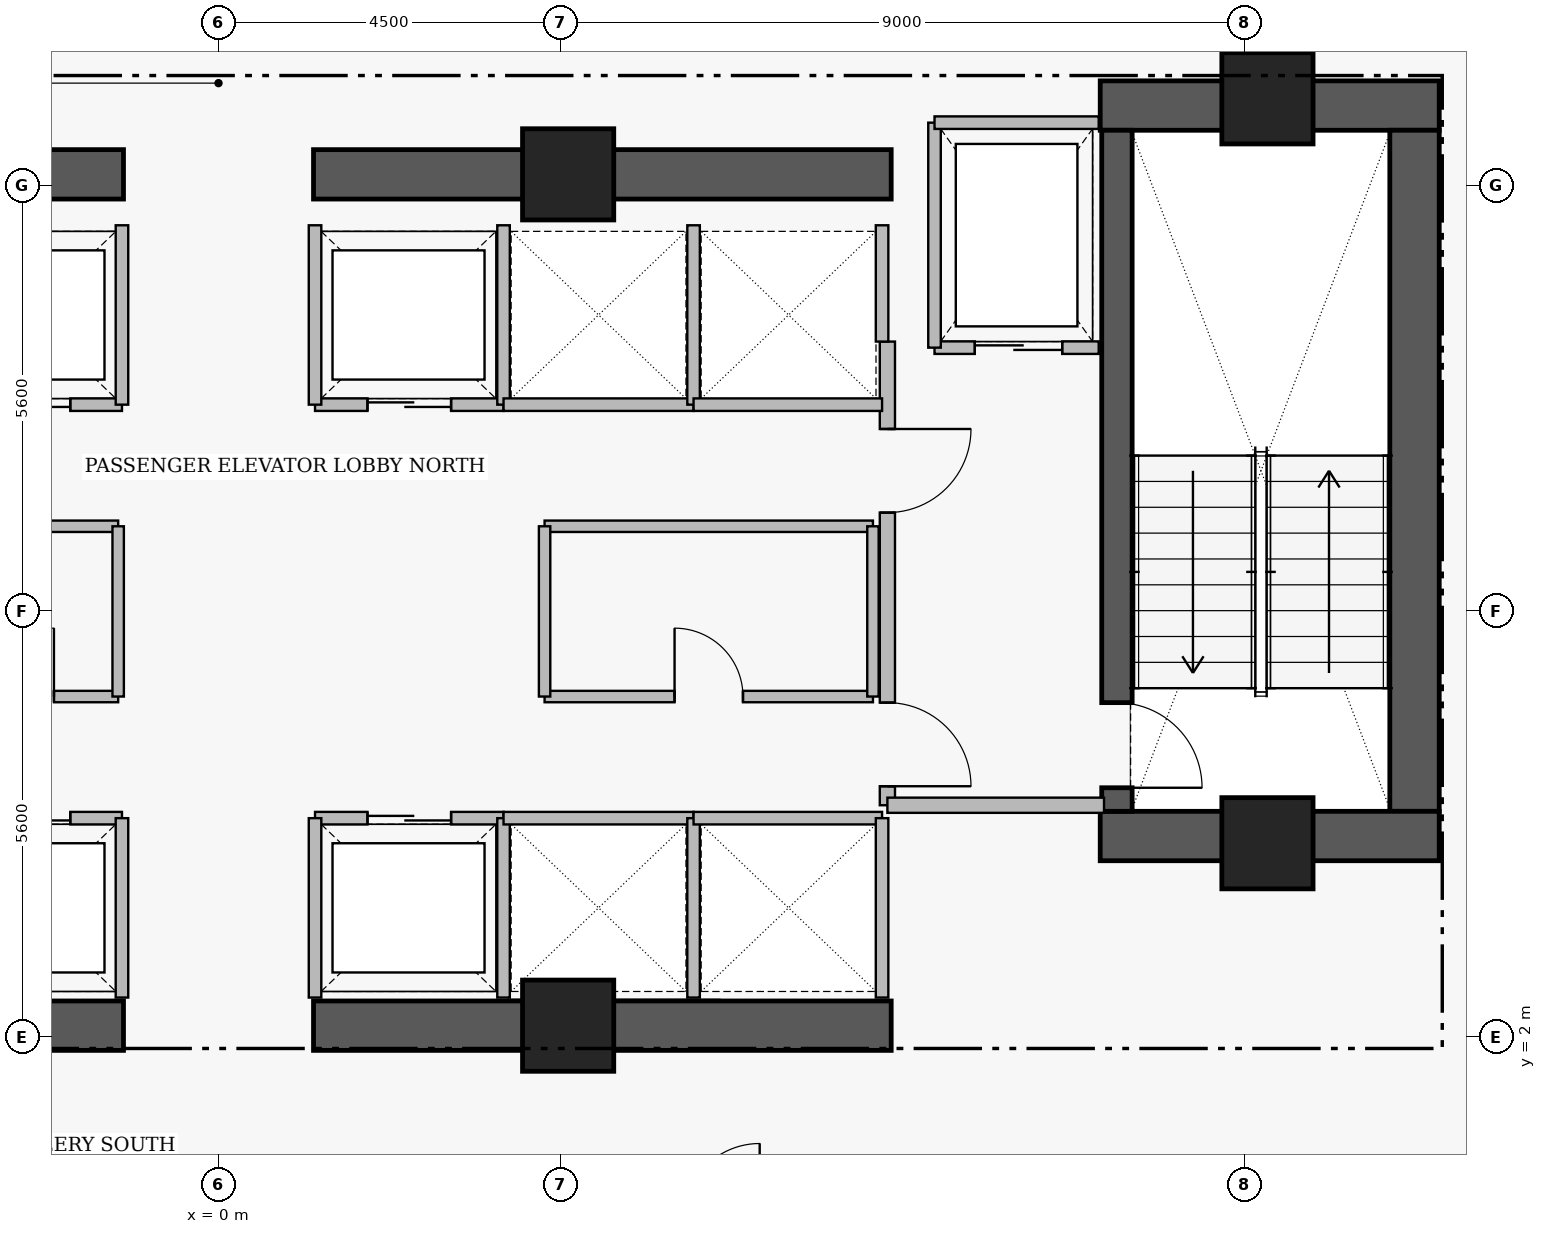
"""IFC4 building model, lengths in metres.
Left out: names, types, materials, properties, quantities, classifications, styles, units other than length and angle.
Written with IfcOpenShell. Run it as: python <this file> out.ifc"""

import sys

from ifc_helpers import new_model, si_unit, direction, frame, frame_2d, origin, origin_2d, place, context, subcontext, project, spatial, rectangle, extrude, element, fill, save


model = new_model("IFC4")
c1 = context("Model", 3, precision=1e-05, world=origin(), true_north=direction((0.0, 1.0)))
c2 = subcontext(c1, "Body", "Model", "MODEL_VIEW")
j1 = project(units=[si_unit("LENGTHUNIT", "METRE"), si_unit("PLANEANGLEUNIT", "RADIAN")], contexts=[c1])
p1 = place(None, origin())
s1 = spatial("IfcSite", under=j1, at=p1, CompositionType="ELEMENT")
p2 = place(p1, origin())
s2 = spatial("IfcBuilding", under=s1, at=p2, CompositionType="ELEMENT")
p3 = place(p2, frame((0.0, 0.0, 211.15)))
s3 = spatial("IfcBuildingStorey", under=s2, at=p3, CompositionType="ELEMENT", Elevation=211.15)
p4 = place(p3, frame((11.6, 14.255, 0.0), z_axis=(0.0, 0.0, 1.0), x_axis=(1.0, 0.0, 0.0)))
e1 = element("IfcWall", 1, at=p4, inside=s3, PredefinedType="SHEAR", context=c2, shape_type="SweptSolid", body=[
    extrude(rectangle(XDim=4.46, YDim=0.65, at=frame_2d((2.23, 0.0))), origin(), (0.0, 0.0, 1.0), 3.56),
])
p5 = place(p3, frame((15.735, 4.97, 0.0), z_axis=(0.0, 0.0, 1.0), x_axis=(0.0, 1.0, 0.0)))
e2 = element("IfcWall", 2, at=p5, inside=s3, PredefinedType="SHEAR", context=c2, shape_type="SweptSolid", body=[
    extrude(rectangle(XDim=8.96, YDim=0.65, at=frame_2d((4.48, 0.0))), origin(), (0.0, 0.0, 1.0), 3.56),
])
p6 = place(p3, frame((11.6, 4.645, 0.0), z_axis=(0.0, 0.0, 1.0), x_axis=(1.0, 0.0, 0.0)))
e3 = element("IfcWall", 3, at=p6, inside=s3, PredefinedType="SHEAR", context=c2, shape_type="SweptSolid", body=[
    extrude(rectangle(XDim=4.46, YDim=0.65, at=frame_2d((2.23, 0.0))), origin(), (0.0, 0.0, 1.0), 3.56),
])
for number, where, z_axis, x_axis in (
    (4, (-8.85, 2.15, 0.0), (0.0, 0.0, 1.0), (1.0, 0.0, 0.0)),
    (5, (1.25, 2.15, 0.0), (0.0, 0.0, 1.0), (1.0, 0.0, 0.0)),
    (6, (-8.85, 13.35, 0.0), (0.0, 0.0, 1.0), (1.0, 0.0, 0.0)),
    (7, (1.25, 13.35, 0.0), (0.0, 0.0, 1.0), (1.0, 0.0, 0.0)),
):
    element("IfcWall", number, at=place(p3, frame(where, z_axis=z_axis, x_axis=x_axis)), inside=s3, PredefinedType="SHEAR", context=c2, shape_type="SweptSolid", body=[
        extrude(rectangle(XDim=7.6, YDim=0.65, at=frame_2d((3.8, 0.0))), origin(), (0.0, 0.0, 1.0), 3.53),
    ])
p7 = place(p3, frame((11.82, 13.93, 0.0), z_axis=(0.0, 0.0, 1.0), x_axis=(0.0, -1.0, 0.0)))
e8 = element("IfcWall", 8, at=p7, inside=s3, PredefinedType="SHEAR", context=c2, shape_type="SweptSolid", body=[
    extrude(rectangle(XDim=8.96, YDim=0.4, at=frame_2d((4.48, 0.0))), origin(), (0.0, 0.0, 1.0), 3.56),
])
p8 = place(p7, frame((7.53, 0.0, 0.0)))
e9 = element("IfcOpeningElement", 9, at=p8, cuts=e8, PredefinedType="OPENING", context=c2, shape_type="SweptSolid", body=[
    extrude(rectangle(XDim=1.12, YDim=2.22, at=frame_2d((0.56, 1.11))), frame((0.0, 0.21, 0.0), z_axis=(0.0, -1.0, 0.0), x_axis=(1.0, 0.0, 0.0)), (0.0, 0.0, 1.0), 0.42),
])
for number, where, z_axis, x_axis in (
    (10, (4.6, 13.35, 0.0), (0.0, 0.0, 1.0), (1.0, 0.0, 0.0)),
    (11, (13.8, 14.35, 0.0), (0.0, 0.0, 1.0), (1.0, 0.0, 0.0)),
    (12, (4.6, 2.15, 0.0), (0.0, 0.0, 1.0), (1.0, 0.0, 0.0)),
    (13, (13.8, 4.55, 0.0), (0.0, 0.0, 1.0), (1.0, 0.0, 0.0)),
):
    element("IfcColumn", number, at=place(p3, frame(where, z_axis=z_axis, x_axis=x_axis)), inside=s3, PredefinedType="COLUMN", context=c2, shape_type="SweptSolid", body=[
        extrude(rectangle(XDim=1.2, YDim=1.2, at=origin_2d()), origin(), (0.0, 0.0, 1.0), 3.75),
    ])
p9 = place(p3, frame((8.8, 11.15, 0.0), z_axis=(0.0, 0.0, 1.0), x_axis=(0.0, -1.0, 0.0)))
e14 = element("IfcWall", 14, at=p9, inside=s3, PredefinedType="PARTITIONING", context=c2, shape_type="SweptSolid", body=[
    extrude(rectangle(XDim=6.1, YDim=0.2, at=frame_2d((3.05, 0.0))), origin(), (0.0, 0.0, 1.0), 3.53),
])
p10 = place(p9, frame((1.15, 0.0, 0.0)))
e15 = element("IfcOpeningElement", 15, at=p10, cuts=e14, PredefinedType="OPENING", context=c2, shape_type="SweptSolid", body=[
    extrude(rectangle(XDim=1.1, YDim=2.2, at=frame_2d((0.55, 1.1))), frame((0.0, 0.11, 0.0), z_axis=(0.0, -1.0, 0.0), x_axis=(1.0, 0.0, 0.0)), (0.0, 0.0, 1.0), 0.22),
])
p11 = place(p9, frame((4.75, 0.0, 0.0)))
e16 = element("IfcOpeningElement", 16, at=p11, cuts=e14, PredefinedType="OPENING", context=c2, shape_type="SweptSolid", body=[
    extrude(rectangle(XDim=1.1, YDim=2.2, at=frame_2d((0.55, 1.1))), frame((0.0, 0.11, 0.0), z_axis=(0.0, -1.0, 0.0), x_axis=(1.0, 0.0, 0.0)), (0.0, 0.0, 1.0), 0.22),
])
p12 = place(p3, frame((9.42, 11.07, 0.0), z_axis=(0.0, 0.0, 1.0), x_axis=(1.0, 0.0, 0.0)))
e17 = element("IfcWall", 17, at=p12, inside=s3, PredefinedType="PARTITIONING", context=c2, shape_type="SweptSolid", body=[
    extrude(rectangle(XDim=2.16, YDim=0.165, at=frame_2d((1.08, 0.0))), origin(), (0.0, 0.0, 1.0), 3.53),
])
p13 = place(p12, frame((0.53, 0.0, 0.0)))
e18 = element("IfcOpeningElement", 18, at=p13, cuts=e17, PredefinedType="OPENING", context=c2, shape_type="SweptSolid", body=[
    extrude(rectangle(XDim=1.15, YDim=2.25, at=frame_2d((0.575, 1.125))), frame((0.0, 0.093, 0.0), z_axis=(0.0, -1.0, 0.0), x_axis=(1.0, 0.0, 0.0)), (0.0, 0.0, 1.0), 0.185),
])
p14 = place(p3, frame((-3.73, 4.88, 0.0), z_axis=(0.0, 0.0, 1.0), x_axis=(1.0, 0.0, 0.0)))
e19 = element("IfcWall", 19, at=p14, inside=s3, PredefinedType="PARTITIONING", context=c2, shape_type="SweptSolid", body=[
    extrude(rectangle(XDim=2.46, YDim=0.165, at=frame_2d((1.23, 0.0))), origin(), (0.0, 0.0, 1.0), 3.53),
])
p15 = place(p14, frame((0.68, 0.0, 0.0)))
e20 = element("IfcOpeningElement", 20, at=p15, cuts=e19, PredefinedType="OPENING", context=c2, shape_type="SweptSolid", body=[
    extrude(rectangle(XDim=1.1, YDim=2.25, at=frame_2d((0.55, 1.125))), frame((0.0, 0.093, 0.0), z_axis=(0.0, -1.0, 0.0), x_axis=(1.0, 0.0, 0.0)), (0.0, 0.0, 1.0), 0.185),
])
p16 = place(p3, frame((1.27, 4.88, 0.0), z_axis=(0.0, 0.0, 1.0), x_axis=(1.0, 0.0, 0.0)))
e21 = element("IfcWall", 21, at=p16, inside=s3, PredefinedType="PARTITIONING", context=c2, shape_type="SweptSolid", body=[
    extrude(rectangle(XDim=2.48, YDim=0.165, at=frame_2d((1.24, 0.0))), origin(), (0.0, 0.0, 1.0), 3.53),
])
p17 = place(p16, frame((0.69, 0.0, 0.0)))
e22 = element("IfcOpeningElement", 22, at=p17, cuts=e21, PredefinedType="OPENING", context=c2, shape_type="SweptSolid", body=[
    extrude(rectangle(XDim=1.1, YDim=2.25, at=frame_2d((0.55, 1.125))), frame((0.0, 0.093, 0.0), z_axis=(0.0, -1.0, 0.0), x_axis=(1.0, 0.0, 0.0)), (0.0, 0.0, 1.0), 0.185),
])
p18 = place(p3, frame((-3.73, 10.32, 0.0), z_axis=(0.0, 0.0, 1.0), x_axis=(1.0, 0.0, 0.0)))
e23 = element("IfcWall", 23, at=p18, inside=s3, PredefinedType="PARTITIONING", context=c2, shape_type="SweptSolid", body=[
    extrude(rectangle(XDim=2.46, YDim=0.165, at=frame_2d((1.23, 0.0))), origin(), (0.0, 0.0, 1.0), 3.53),
])
p19 = place(p18, frame((0.68, 0.0, 0.0)))
e24 = element("IfcOpeningElement", 24, at=p19, cuts=e23, PredefinedType="OPENING", context=c2, shape_type="SweptSolid", body=[
    extrude(rectangle(XDim=1.1, YDim=2.25, at=frame_2d((0.55, 1.125))), frame((0.0, 0.093, 0.0), z_axis=(0.0, -1.0, 0.0), x_axis=(1.0, 0.0, 0.0)), (0.0, 0.0, 1.0), 0.185),
])
p20 = place(p3, frame((1.27, 10.32, 0.0), z_axis=(0.0, 0.0, 1.0), x_axis=(1.0, 0.0, 0.0)))
e25 = element("IfcWall", 25, at=p20, inside=s3, PredefinedType="PARTITIONING", context=c2, shape_type="SweptSolid", body=[
    extrude(rectangle(XDim=2.48, YDim=0.165, at=frame_2d((1.24, 0.0))), origin(), (0.0, 0.0, 1.0), 3.53),
])
p21 = place(p20, frame((0.69, 0.0, 0.0)))
e26 = element("IfcOpeningElement", 26, at=p21, cuts=e25, PredefinedType="OPENING", context=c2, shape_type="SweptSolid", body=[
    extrude(rectangle(XDim=1.1, YDim=2.25, at=frame_2d((0.55, 1.125))), frame((0.0, 0.093, 0.0), z_axis=(0.0, -1.0, 0.0), x_axis=(1.0, 0.0, 0.0)), (0.0, 0.0, 1.0), 0.185),
])
p22 = place(p3, frame((-3.91, 6.48, 0.0), z_axis=(0.0, 0.0, 1.0), x_axis=(1.0, 0.0, 0.0)))
e27 = element("IfcWall", 27, at=p22, inside=s3, PredefinedType="PARTITIONING", context=c2, shape_type="SweptSolid", body=[
    extrude(rectangle(XDim=2.59, YDim=0.15, at=frame_2d((1.295, 0.0))), origin(), (0.0, 0.0, 1.0), 3.53),
])
p23 = place(p22, frame((0.845, 0.0, 0.0)))
e28 = element("IfcOpeningElement", 28, at=p23, cuts=e27, PredefinedType="OPENING", context=c2, shape_type="SweptSolid", body=[
    extrude(rectangle(XDim=0.9, YDim=2.15, at=frame_2d((0.45, 1.075))), frame((0.0, 0.085, 0.0), z_axis=(0.0, -1.0, 0.0), x_axis=(1.0, 0.0, 0.0)), (0.0, 0.0, 1.0), 0.17),
])
p24 = place(p3, frame((4.29, 6.48, 0.0), z_axis=(0.0, 0.0, 1.0), x_axis=(1.0, 0.0, 0.0)))
e29 = element("IfcWall", 29, at=p24, inside=s3, PredefinedType="PARTITIONING", context=c2, shape_type="SweptSolid", body=[
    extrude(rectangle(XDim=4.32, YDim=0.15, at=frame_2d((2.16, 0.0))), origin(), (0.0, 0.0, 1.0), 3.53),
])
p25 = place(p24, frame((1.71, 0.0, 0.0)))
e30 = element("IfcOpeningElement", 30, at=p25, cuts=e29, PredefinedType="OPENING", context=c2, shape_type="SweptSolid", body=[
    extrude(rectangle(XDim=0.9, YDim=2.15, at=frame_2d((0.45, 1.075))), frame((0.0, 0.085, 0.0), z_axis=(0.0, -1.0, 0.0), x_axis=(1.0, 0.0, 0.0)), (0.0, 0.0, 1.0), 0.17),
])
p26 = place(p3, frame((8.8, 5.05, 0.0), z_axis=(0.0, 0.0, 1.0), x_axis=(1.0, 0.0, 0.0)))
e31 = element("IfcWall", 31, at=p26, inside=s3, PredefinedType="PARTITIONING", context=c2, shape_type="SweptSolid", body=[
    extrude(rectangle(XDim=2.85, YDim=0.2, at=frame_2d((1.425, 0.0))), origin(), (0.0, 0.0, 1.0), 3.53),
])
p27 = place(p3, frame((9.42, 11.07, 0.0), z_axis=(0.0, 0.0, 1.0), x_axis=(0.0, 1.0, 0.0)))
e32 = element("IfcWall", 32, at=p27, inside=s3, PredefinedType="PARTITIONING", context=c2, shape_type="SweptSolid", body=[
    extrude(rectangle(XDim=2.96, YDim=0.165, at=frame_2d((1.48, 0.0))), origin(), (0.0, 0.0, 1.0), 3.53),
])
p28 = place(p3, frame((9.42, 14.03, 0.0), z_axis=(0.0, 0.0, 1.0), x_axis=(1.0, 0.0, 0.0)))
e33 = element("IfcWall", 33, at=p28, inside=s3, PredefinedType="PARTITIONING", context=c2, shape_type="SweptSolid", body=[
    extrude(rectangle(XDim=2.16, YDim=0.165, at=frame_2d((1.08, 0.0))), origin(), (0.0, 0.0, 1.0), 3.53),
])
for number, where, z_axis, x_axis in (
    (34, (-1.27, 2.52, 0.0), (0.0, 0.0, 1.0), (0.0, 1.0, 0.0)),
    (35, (1.27, 2.52, 0.0), (0.0, 0.0, 1.0), (0.0, 1.0, 0.0)),
    (36, (3.75, 2.52, 0.0), (0.0, 0.0, 1.0), (0.0, 1.0, 0.0)),
    (37, (-1.27, 10.32, 0.0), (0.0, 0.0, 1.0), (0.0, 1.0, 0.0)),
    (38, (1.27, 10.32, 0.0), (0.0, 0.0, 1.0), (0.0, 1.0, 0.0)),
    (39, (3.75, 10.32, 0.0), (0.0, 0.0, 1.0), (0.0, 1.0, 0.0)),
):
    element("IfcWall", number, at=place(p3, frame(where, z_axis=z_axis, x_axis=x_axis)), inside=s3, PredefinedType="PARTITIONING", context=c2, shape_type="SweptSolid", body=[
        extrude(rectangle(XDim=2.36, YDim=0.165, at=frame_2d((1.18, 0.0))), origin(), (0.0, 0.0, 1.0), 3.53),
    ])
p29 = place(p3, frame((3.75, 4.88, 0.0), z_axis=(0.0, 0.0, 1.0), x_axis=(1.0, 0.0, 0.0)))
e40 = element("IfcWall", 40, at=p29, inside=s3, PredefinedType="PARTITIONING", context=c2, shape_type="SweptSolid", body=[
    extrude(rectangle(XDim=2.5, YDim=0.165, at=frame_2d((1.25, 0.0))), origin(), (0.0, 0.0, 1.0), 3.53),
])
p30 = place(p3, frame((6.25, 2.52, 0.0), z_axis=(0.0, 0.0, 1.0), x_axis=(0.0, 1.0, 0.0)))
e41 = element("IfcWall", 41, at=p30, inside=s3, PredefinedType="PARTITIONING", context=c2, shape_type="SweptSolid", body=[
    extrude(rectangle(XDim=2.36, YDim=0.165, at=frame_2d((1.18, 0.0))), origin(), (0.0, 0.0, 1.0), 3.53),
])
p31 = place(p3, frame((6.25, 4.88, 0.0), z_axis=(0.0, 0.0, 1.0), x_axis=(1.0, 0.0, 0.0)))
e42 = element("IfcWall", 42, at=p31, inside=s3, PredefinedType="PARTITIONING", context=c2, shape_type="SweptSolid", body=[
    extrude(rectangle(XDim=2.48, YDim=0.165, at=frame_2d((1.24, 0.0))), origin(), (0.0, 0.0, 1.0), 3.53),
])
p32 = place(p3, frame((8.73, 2.52, 0.0), z_axis=(0.0, 0.0, 1.0), x_axis=(0.0, 1.0, 0.0)))
e43 = element("IfcWall", 43, at=p32, inside=s3, PredefinedType="PARTITIONING", context=c2, shape_type="SweptSolid", body=[
    extrude(rectangle(XDim=2.36, YDim=0.165, at=frame_2d((1.18, 0.0))), origin(), (0.0, 0.0, 1.0), 3.53),
])
p33 = place(p3, frame((3.75, 10.32, 0.0), z_axis=(0.0, 0.0, 1.0), x_axis=(1.0, 0.0, 0.0)))
e44 = element("IfcWall", 44, at=p33, inside=s3, PredefinedType="PARTITIONING", context=c2, shape_type="SweptSolid", body=[
    extrude(rectangle(XDim=2.5, YDim=0.165, at=frame_2d((1.25, 0.0))), origin(), (0.0, 0.0, 1.0), 3.53),
])
p34 = place(p3, frame((6.25, 10.32, 0.0), z_axis=(0.0, 0.0, 1.0), x_axis=(0.0, 1.0, 0.0)))
e45 = element("IfcWall", 45, at=p34, inside=s3, PredefinedType="PARTITIONING", context=c2, shape_type="SweptSolid", body=[
    extrude(rectangle(XDim=2.36, YDim=0.165, at=frame_2d((1.18, 0.0))), origin(), (0.0, 0.0, 1.0), 3.53),
])
p35 = place(p3, frame((6.25, 10.32, 0.0), z_axis=(0.0, 0.0, 1.0), x_axis=(1.0, 0.0, 0.0)))
e46 = element("IfcWall", 46, at=p35, inside=s3, PredefinedType="PARTITIONING", context=c2, shape_type="SweptSolid", body=[
    extrude(rectangle(XDim=2.48, YDim=0.165, at=frame_2d((1.24, 0.0))), origin(), (0.0, 0.0, 1.0), 3.53),
])
p36 = place(p3, frame((8.73, 11.15, 0.0), z_axis=(0.0, 0.0, 1.0), x_axis=(0.0, 1.0, 0.0)))
e47 = element("IfcWall", 47, at=p36, inside=s3, PredefinedType="PARTITIONING", context=c2, shape_type="SweptSolid", body=[
    extrude(rectangle(XDim=1.53, YDim=0.165, at=frame_2d((0.765, 0.0))), origin(), (0.0, 0.0, 1.0), 3.53),
])
p37 = place(p3, frame((-3.91, 8.72, 0.0), z_axis=(0.0, 0.0, 1.0), x_axis=(1.0, 0.0, 0.0)))
e48 = element("IfcWall", 48, at=p37, inside=s3, PredefinedType="PARTITIONING", context=c2, shape_type="SweptSolid", body=[
    extrude(rectangle(XDim=2.59, YDim=0.15, at=frame_2d((1.295, 0.0))), origin(), (0.0, 0.0, 1.0), 3.53),
])
p38 = place(p3, frame((-1.32, 6.48, 0.0), z_axis=(0.0, 0.0, 1.0), x_axis=(0.0, 1.0, 0.0)))
e49 = element("IfcWall", 49, at=p38, inside=s3, PredefinedType="PARTITIONING", context=c2, shape_type="SweptSolid", body=[
    extrude(rectangle(XDim=2.24, YDim=0.15, at=frame_2d((1.12, 0.0))), origin(), (0.0, 0.0, 1.0), 3.53),
])
p39 = place(p3, frame((4.29, 8.72, 0.0), z_axis=(0.0, 0.0, 1.0), x_axis=(1.0, 0.0, 0.0)))
e50 = element("IfcWall", 50, at=p39, inside=s3, PredefinedType="PARTITIONING", context=c2, shape_type="SweptSolid", body=[
    extrude(rectangle(XDim=4.32, YDim=0.15, at=frame_2d((2.16, 0.0))), origin(), (0.0, 0.0, 1.0), 3.53),
])
for number, where, z_axis, x_axis in (
    (51, (4.29, 6.48, 0.0), (0.0, 0.0, 1.0), (0.0, 1.0, 0.0)),
    (52, (8.61, 6.48, 0.0), (0.0, 0.0, 1.0), (0.0, 1.0, 0.0)),
):
    element("IfcWall", number, at=place(p3, frame(where, z_axis=z_axis, x_axis=x_axis)), inside=s3, PredefinedType="PARTITIONING", context=c2, shape_type="SweptSolid", body=[
        extrude(rectangle(XDim=2.24, YDim=0.15, at=frame_2d((1.12, 0.0))), origin(), (0.0, 0.0, 1.0), 3.53),
    ])
p40 = place(p8, origin())
e53 = element("IfcDoor", 53, at=p40, inside=s3, OperationType="SINGLE_SWING_RIGHT", PredefinedType="DOOR", context=c2, shape_type="SweptSolid", body=[
    extrude(rectangle(XDim=1.12, YDim=2.22, at=frame_2d((0.56, 1.11))), frame((0.0, 0.025, 0.0), z_axis=(0.0, -1.0, 0.0), x_axis=(1.0, 0.0, 0.0)), (0.0, 0.0, 1.0), 0.05),
])
fill(e9, e53)
p41 = place(p10, origin())
e54 = element("IfcDoor", 54, at=p41, inside=s3, OperationType="SINGLE_SWING_LEFT", PredefinedType="DOOR", context=c2, shape_type="SweptSolid", body=[
    extrude(rectangle(XDim=1.1, YDim=2.2, at=frame_2d((0.55, 1.1))), frame((0.0, 0.025, 0.0), z_axis=(0.0, -1.0, 0.0), x_axis=(1.0, 0.0, 0.0)), (0.0, 0.0, 1.0), 0.05),
])
fill(e15, e54)
p42 = place(p11, origin())
e55 = element("IfcDoor", 55, at=p42, inside=s3, OperationType="SINGLE_SWING_RIGHT", PredefinedType="DOOR", context=c2, shape_type="SweptSolid", body=[
    extrude(rectangle(XDim=1.1, YDim=2.2, at=frame_2d((0.55, 1.1))), frame((0.0, 0.025, 0.0), z_axis=(0.0, -1.0, 0.0), x_axis=(1.0, 0.0, 0.0)), (0.0, 0.0, 1.0), 0.05),
])
fill(e16, e55)
p43 = place(p13, origin())
e56 = element("IfcDoor", 56, at=p43, inside=s3, OperationType="SLIDING_TO_LEFT", PredefinedType="DOOR", context=c2, shape_type="SweptSolid", body=[
    extrude(rectangle(XDim=1.15, YDim=2.25, at=frame_2d((0.575, 1.125))), frame((0.0, 0.025, 0.0), z_axis=(0.0, -1.0, 0.0), x_axis=(1.0, 0.0, 0.0)), (0.0, 0.0, 1.0), 0.05),
])
fill(e18, e56)
p44 = place(p15, origin())
e57 = element("IfcDoor", 57, at=p44, inside=s3, OperationType="SLIDING_TO_LEFT", PredefinedType="DOOR", context=c2, shape_type="SweptSolid", body=[
    extrude(rectangle(XDim=1.1, YDim=2.25, at=frame_2d((0.55, 1.125))), frame((0.0, 0.025, 0.0), z_axis=(0.0, -1.0, 0.0), x_axis=(1.0, 0.0, 0.0)), (0.0, 0.0, 1.0), 0.05),
])
fill(e20, e57)
p45 = place(p17, origin())
e58 = element("IfcDoor", 58, at=p45, inside=s3, OperationType="SLIDING_TO_LEFT", PredefinedType="DOOR", context=c2, shape_type="SweptSolid", body=[
    extrude(rectangle(XDim=1.1, YDim=2.25, at=frame_2d((0.55, 1.125))), frame((0.0, 0.025, 0.0), z_axis=(0.0, -1.0, 0.0), x_axis=(1.0, 0.0, 0.0)), (0.0, 0.0, 1.0), 0.05),
])
fill(e22, e58)
p46 = place(p19, origin())
e59 = element("IfcDoor", 59, at=p46, inside=s3, OperationType="SLIDING_TO_LEFT", PredefinedType="DOOR", context=c2, shape_type="SweptSolid", body=[
    extrude(rectangle(XDim=1.1, YDim=2.25, at=frame_2d((0.55, 1.125))), frame((0.0, 0.025, 0.0), z_axis=(0.0, -1.0, 0.0), x_axis=(1.0, 0.0, 0.0)), (0.0, 0.0, 1.0), 0.05),
])
fill(e24, e59)
p47 = place(p21, origin())
e60 = element("IfcDoor", 60, at=p47, inside=s3, OperationType="SLIDING_TO_LEFT", PredefinedType="DOOR", context=c2, shape_type="SweptSolid", body=[
    extrude(rectangle(XDim=1.1, YDim=2.25, at=frame_2d((0.55, 1.125))), frame((0.0, 0.025, 0.0), z_axis=(0.0, -1.0, 0.0), x_axis=(1.0, 0.0, 0.0)), (0.0, 0.0, 1.0), 0.05),
])
fill(e26, e60)
p48 = place(p23, origin())
e61 = element("IfcDoor", 61, at=p48, inside=s3, OperationType="SINGLE_SWING_RIGHT", PredefinedType="DOOR", context=c2, shape_type="SweptSolid", body=[
    extrude(rectangle(XDim=0.9, YDim=2.15, at=frame_2d((0.45, 1.075))), frame((0.0, 0.025, 0.0), z_axis=(0.0, -1.0, 0.0), x_axis=(1.0, 0.0, 0.0)), (0.0, 0.0, 1.0), 0.05),
])
fill(e28, e61)
p49 = place(p25, origin())
e62 = element("IfcDoor", 62, at=p49, inside=s3, OperationType="SINGLE_SWING_LEFT", PredefinedType="DOOR", context=c2, shape_type="SweptSolid", body=[
    extrude(rectangle(XDim=0.9, YDim=2.15, at=frame_2d((0.45, 1.075))), frame((0.0, 0.025, 0.0), z_axis=(0.0, -1.0, 0.0), x_axis=(1.0, 0.0, 0.0)), (0.0, 0.0, 1.0), 0.05),
])
fill(e30, e62)
save(model, sys.argv[1])
